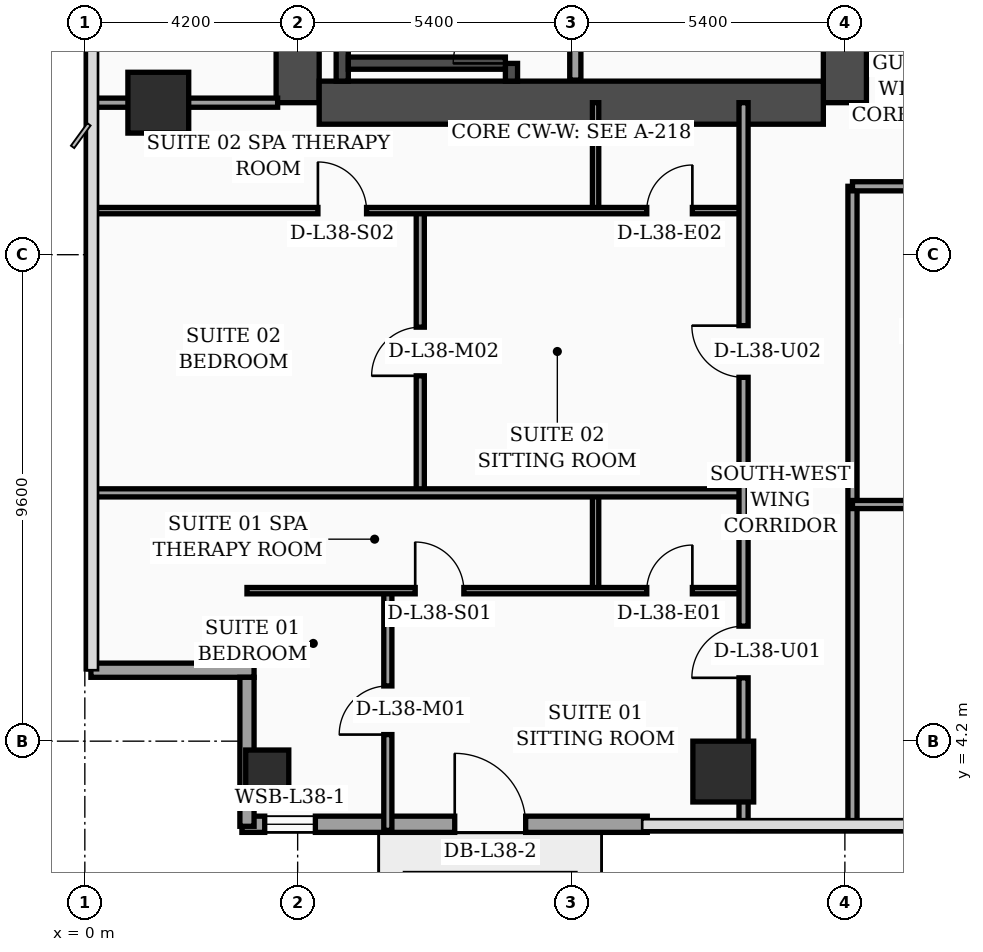
"""IFC4 building model, lengths in metres.
Left out: names, types, materials, properties, quantities, classifications, styles, units other than length and angle.
Written with IfcOpenShell. Run it as: python <this file> out.ifc"""

import sys

from ifc_helpers import new_model, si_unit, direction, frame, frame_2d, origin, origin_2d, place, context, subcontext, project, spatial, rectangle, hollow_rectangle, extrude, element, fill, save


model = new_model("IFC4")
c1 = context("Model", 3, precision=1e-05, world=origin(), true_north=direction((0.0, 1.0)))
c2 = subcontext(c1, "Body", "Model", "MODEL_VIEW")
j1 = project(units=[si_unit("LENGTHUNIT", "METRE"), si_unit("PLANEANGLEUNIT", "RADIAN")], contexts=[c1])
p1 = place(None, origin())
s1 = spatial("IfcSite", under=j1, at=p1, CompositionType="ELEMENT")
p2 = place(p1, origin())
s2 = spatial("IfcBuilding", under=s1, at=p2, CompositionType="ELEMENT")
p3 = place(p2, frame((0.0, 0.0, 156.1)))
s3 = spatial("IfcBuildingStorey", under=s2, at=p3, CompositionType="ELEMENT", Elevation=156.1)
p4 = place(p3, frame((4.2, 16.8, 0.0), z_axis=(0.0, 0.0, 1.0), x_axis=(0.0, 1.0, 0.0)))
e1 = element("IfcWall", 1, at=p4, inside=s3, PredefinedType="SHEAR", context=c2, shape_type="SweptSolid", body=[
    extrude(rectangle(XDim=21.6, YDim=0.85, at=frame_2d((10.8, 0.0))), origin(), (0.0, 0.0, 1.0), 3.56),
])
p5 = place(p3, frame((15.0, 16.8, 0.0), z_axis=(0.0, 0.0, 1.0), x_axis=(0.0, 1.0, 0.0)))
e2 = element("IfcWall", 2, at=p5, inside=s3, PredefinedType="SHEAR", context=c2, shape_type="SweptSolid", body=[
    extrude(rectangle(XDim=21.6, YDim=0.85, at=frame_2d((10.8, 0.0))), origin(), (0.0, 0.0, 1.0), 3.56),
])
p6 = place(p5, frame((8.65, 0.0, 0.0)))
e3 = element("IfcOpeningElement", 3, at=p6, cuts=e2, PredefinedType="OPENING", context=c2, shape_type="SweptSolid", body=[
    extrude(rectangle(XDim=1.1, YDim=2.2, at=frame_2d((0.55, 1.1))), frame((0.0, 0.435, 0.0), z_axis=(0.0, -1.0, 0.0), x_axis=(1.0, 0.0, 0.0)), (0.0, 0.0, 1.0), 0.87),
])
p7 = place(p5, frame((10.85, 0.0, 0.0)))
e4 = element("IfcOpeningElement", 4, at=p7, cuts=e2, PredefinedType="OPENING", context=c2, shape_type="SweptSolid", body=[
    extrude(rectangle(XDim=1.1, YDim=2.2, at=frame_2d((0.55, 1.1))), frame((0.0, 0.435, 0.0), z_axis=(0.0, -1.0, 0.0), x_axis=(1.0, 0.0, 0.0)), (0.0, 0.0, 1.0), 0.87),
])
p8 = place(p5, frame((13.5, 0.0, 0.0)))
e5 = element("IfcOpeningElement", 5, at=p8, cuts=e2, PredefinedType="OPENING", context=c2, shape_type="SweptSolid", body=[
    extrude(rectangle(XDim=1.1, YDim=2.2, at=frame_2d((0.55, 1.1))), frame((0.0, 0.435, 0.0), z_axis=(0.0, -1.0, 0.0), x_axis=(1.0, 0.0, 0.0)), (0.0, 0.0, 1.0), 0.87),
])
p9 = place(p5, frame((16.15, 0.0, 0.0)))
e6 = element("IfcOpeningElement", 6, at=p9, cuts=e2, PredefinedType="OPENING", context=c2, shape_type="SweptSolid", body=[
    extrude(rectangle(XDim=1.1, YDim=2.2, at=frame_2d((0.55, 1.1))), frame((0.0, 0.435, 0.0), z_axis=(0.0, -1.0, 0.0), x_axis=(1.0, 0.0, 0.0)), (0.0, 0.0, 1.0), 0.87),
])
p10 = place(p3, frame((4.625, 16.8, 0.0), z_axis=(0.0, 0.0, 1.0), x_axis=(1.0, 0.0, 0.0)))
e7 = element("IfcWall", 7, at=p10, inside=s3, PredefinedType="SHEAR", context=c2, shape_type="SweptSolid", body=[
    extrude(rectangle(XDim=9.95, YDim=0.85, at=frame_2d((4.975, 0.0))), origin(), (0.0, 0.0, 1.0), 3.56),
])
p11 = place(p3, frame((5.08, 17.225, 0.0), z_axis=(0.0, 0.0, 1.0), x_axis=(0.0, 1.0, 0.0)))
e8 = element("IfcWall", 8, at=p11, inside=s3, PredefinedType="SOLIDWALL", context=c2, shape_type="SweptSolid", body=[
    extrude(rectangle(XDim=9.565, YDim=0.24, at=frame_2d((4.782, 0.0))), origin(), (0.0, 0.0, 1.0), 3.56),
])
p12 = place(p3, frame((8.42, 17.225, 0.0), z_axis=(0.0, 0.0, 1.0), x_axis=(0.0, 1.0, 0.0)))
e9 = element("IfcWall", 9, at=p12, inside=s3, PredefinedType="SOLIDWALL", context=c2, shape_type="SweptSolid", body=[
    extrude(rectangle(XDim=9.565, YDim=0.24, at=frame_2d((4.782, 0.0))), origin(), (0.0, 0.0, 1.0), 3.56),
])
p13 = place(p12, frame((0.35, 0.0, 0.0)))
e10 = element("IfcOpeningElement", 10, at=p13, cuts=e9, PredefinedType="OPENING", context=c2, shape_type="SweptSolid", body=[
    extrude(rectangle(XDim=1.15, YDim=2.2, at=frame_2d((0.575, 1.1))), frame((0.0, 0.13, 0.0), z_axis=(0.0, -1.0, 0.0), x_axis=(1.0, 0.0, 0.0)), (0.0, 0.0, 1.0), 0.26),
])
p14 = place(p3, frame((5.2, 17.58, 0.0), z_axis=(0.0, 0.0, 1.0), x_axis=(1.0, 0.0, 0.0)))
e11 = element("IfcWall", 11, at=p14, inside=s3, PredefinedType="SOLIDWALL", context=c2, shape_type="SweptSolid", body=[
    extrude(rectangle(XDim=3.1, YDim=0.24, at=frame_2d((1.55, 0.0))), origin(), (0.0, 0.0, 1.0), 3.56),
])
p15 = place(p3, frame((3.6, 3.6, 0.0), z_axis=(0.0, 0.0, 1.0), x_axis=(1.0, 0.0, 0.0)))
e12 = element("IfcColumn", 12, at=p15, inside=s3, PredefinedType="COLUMN", context=c2, shape_type="SweptSolid", body=[
    extrude(hollow_rectangle(XDim=0.85, YDim=0.85, WallThickness=0.036, at=origin_2d()), origin(), (0.0, 0.0, 1.0), 3.56),
])
for number, where, z_axis, x_axis in (
    (13, (1.45, 16.8, 0.0), (0.0, 0.0, 1.0), (1.0, 0.0, 0.0)),
    (14, (12.6, 3.6, 0.0), (0.0, 0.0, 1.0), (1.0, 0.0, 0.0)),
):
    element("IfcColumn", number, at=place(p3, frame(where, z_axis=z_axis, x_axis=x_axis)), inside=s3, PredefinedType="COLUMN", context=c2, shape_type="SweptSolid", body=[
        extrude(rectangle(XDim=1.2, YDim=1.2, at=origin_2d()), origin(), (0.0, 0.0, 1.0), 3.56),
    ])
p16 = place(p3, frame((3.1, 2.56, 0.0), z_axis=(0.0, 0.0, 1.0), x_axis=(1.0, 0.0, 0.0)))
e15 = element("IfcWall", 15, at=p16, inside=s3, PredefinedType="SOLIDWALL", context=c2, shape_type="SweptSolid", body=[
    extrude(rectangle(XDim=8.0, YDim=0.32, at=frame_2d((4.0, 0.0))), origin(), (0.0, 0.0, 1.0), 3.56),
])
p17 = place(p16, frame((0.45, 0.0, 0.75)))
e16 = element("IfcOpeningElement", 16, at=p17, cuts=e15, PredefinedType="OPENING", context=c2, shape_type="SweptSolid", body=[
    extrude(rectangle(XDim=1.0, YDim=1.6, at=frame_2d((0.5, 0.8))), frame((0.0, 0.17, 0.0), z_axis=(0.0, -1.0, 0.0), x_axis=(1.0, 0.0, 0.0)), (0.0, 0.0, 1.0), 0.34),
])
p18 = place(p16, frame((4.2, 0.0, 0.0)))
e17 = element("IfcOpeningElement", 17, at=p18, cuts=e15, PredefinedType="OPENING", context=c2, shape_type="SweptSolid", body=[
    extrude(rectangle(XDim=1.4, YDim=2.25, at=frame_2d((0.7, 1.125))), frame((0.0, 0.17, 0.0), z_axis=(0.0, -1.0, 0.0), x_axis=(1.0, 0.0, 0.0)), (0.0, 0.0, 1.0), 0.34),
])
p19 = place(p3, frame((0.12, 5.6, 0.0), z_axis=(0.0, 0.0, 1.0), x_axis=(1.0, 0.0, 0.0)))
e18 = element("IfcWall", 18, at=p19, inside=s3, PredefinedType="SOLIDWALL", context=c2, shape_type="SweptSolid", body=[
    extrude(rectangle(XDim=3.22, YDim=0.28, at=frame_2d((1.61, 0.0))), origin(), (0.0, 0.0, 1.0), 2.94),
])
p20 = place(p3, frame((3.2, 5.46, 0.0), z_axis=(0.0, 0.0, 1.0), x_axis=(0.0, -1.0, 0.0)))
e19 = element("IfcWall", 19, at=p20, inside=s3, PredefinedType="SOLIDWALL", context=c2, shape_type="SweptSolid", body=[
    extrude(rectangle(XDim=2.94, YDim=0.28, at=frame_2d((1.47, 0.0))), origin(), (0.0, 0.0, 1.0), 2.94),
])
p21 = place(p3, frame((9.68, 17.245, 0.0), z_axis=(0.0, 0.0, 1.0), x_axis=(0.0, 1.0, 0.0)))
e20 = element("IfcWall", 20, at=p21, inside=s3, PredefinedType="SOLIDWALL", context=c2, shape_type="SweptSolid", body=[
    extrude(rectangle(XDim=7.755, YDim=0.22, at=frame_2d((3.877, 0.0))), origin(), (0.0, 0.0, 1.0), 3.56),
])
p22 = place(p3, frame((0.08, 16.8, 0.0), z_axis=(0.0, 0.0, 1.0), x_axis=(1.0, 0.0, 0.0)))
e21 = element("IfcWall", 21, at=p22, inside=s3, PredefinedType="PARTITIONING", context=c2, shape_type="SweptSolid", body=[
    extrude(rectangle(XDim=3.725, YDim=0.18, at=frame_2d((1.862, 0.0))), origin(), (0.0, 0.0, 1.0), 2.94),
])
p23 = place(p3, frame((10.08, 7.17, 0.0), z_axis=(0.0, 0.0, 1.0), x_axis=(0.0, 1.0, 0.0)))
e22 = element("IfcWall", 22, at=p23, inside=s3, PredefinedType="PARTITIONING", context=c2, shape_type="SweptSolid", body=[
    extrude(rectangle(XDim=1.93, YDim=0.125, at=frame_2d((0.965, 0.0))), origin(), (0.0, 0.0, 1.0), 3.09),
])
p24 = place(p3, frame((5.98, 2.44, 0.0), z_axis=(0.0, 0.0, 1.0), x_axis=(0.0, 1.0, 0.0)))
e23 = element("IfcWall", 23, at=p24, inside=s3, PredefinedType="PARTITIONING", context=c2, shape_type="SweptSolid", body=[
    extrude(rectangle(XDim=4.73, YDim=0.16, at=frame_2d((2.365, 0.0))), origin(), (0.0, 0.0, 1.0), 3.04),
])
p25 = place(p24, frame((1.89, 0.0, 0.0)))
e24 = element("IfcOpeningElement", 24, at=p25, cuts=e23, PredefinedType="OPENING", context=c2, shape_type="SweptSolid", body=[
    extrude(rectangle(XDim=0.96, YDim=2.2, at=frame_2d((0.48, 1.1))), frame((0.0, 0.09, 0.0), z_axis=(0.0, -1.0, 0.0), x_axis=(1.0, 0.0, 0.0)), (0.0, 0.0, 1.0), 0.18),
])
p26 = place(p3, frame((3.2, 7.17, 0.0), z_axis=(0.0, 0.0, 1.0), x_axis=(1.0, 0.0, 0.0)))
e25 = element("IfcWall", 25, at=p26, inside=s3, PredefinedType="PARTITIONING", context=c2, shape_type="SweptSolid", body=[
    extrude(rectangle(XDim=9.8, YDim=0.125, at=frame_2d((4.9, 0.0))), origin(), (0.0, 0.0, 1.0), 2.94),
])
p27 = place(p26, frame((3.32, 0.0, 0.0)))
e26 = element("IfcOpeningElement", 26, at=p27, cuts=e25, PredefinedType="OPENING", context=c2, shape_type="SweptSolid", body=[
    extrude(rectangle(XDim=0.96, YDim=2.2, at=frame_2d((0.48, 1.1))), frame((0.0, 0.073, 0.0), z_axis=(0.0, -1.0, 0.0), x_axis=(1.0, 0.0, 0.0)), (0.0, 0.0, 1.0), 0.145),
])
p28 = place(p26, frame((7.89, 0.0, 0.0)))
e27 = element("IfcOpeningElement", 27, at=p28, cuts=e25, PredefinedType="OPENING", context=c2, shape_type="SweptSolid", body=[
    extrude(rectangle(XDim=0.9, YDim=2.15, at=frame_2d((0.45, 1.075))), frame((0.0, 0.073, 0.0), z_axis=(0.0, -1.0, 0.0), x_axis=(1.0, 0.0, 0.0)), (0.0, 0.0, 1.0), 0.145),
])
p29 = place(p3, frame((10.08, 14.67, 0.0), z_axis=(0.0, 0.0, 1.0), x_axis=(0.0, 1.0, 0.0)))
e28 = element("IfcWall", 28, at=p29, inside=s3, PredefinedType="PARTITIONING", context=c2, shape_type="SweptSolid", body=[
    extrude(rectangle(XDim=2.13, YDim=0.125, at=frame_2d((1.065, 0.0))), origin(), (0.0, 0.0, 1.0), 3.56),
])
p30 = place(p3, frame((6.62, 9.1, 0.0), z_axis=(0.0, 0.0, 1.0), x_axis=(0.0, 1.0, 0.0)))
e29 = element("IfcWall", 29, at=p30, inside=s3, PredefinedType="PARTITIONING", context=c2, shape_type="SweptSolid", body=[
    extrude(rectangle(XDim=5.57, YDim=0.16, at=frame_2d((2.785, 0.0))), origin(), (0.0, 0.0, 1.0), 3.14),
])
p31 = place(p30, frame((2.31, 0.0, 0.0)))
e30 = element("IfcOpeningElement", 30, at=p31, cuts=e29, PredefinedType="OPENING", context=c2, shape_type="SweptSolid", body=[
    extrude(rectangle(XDim=0.96, YDim=2.2, at=frame_2d((0.48, 1.1))), frame((0.0, 0.09, 0.0), z_axis=(0.0, -1.0, 0.0), x_axis=(1.0, 0.0, 0.0)), (0.0, 0.0, 1.0), 0.18),
])
p32 = place(p3, frame((0.08, 14.67, 0.0), z_axis=(0.0, 0.0, 1.0), x_axis=(1.0, 0.0, 0.0)))
e31 = element("IfcWall", 31, at=p32, inside=s3, PredefinedType="PARTITIONING", context=c2, shape_type="SweptSolid", body=[
    extrude(rectangle(XDim=12.92, YDim=0.125, at=frame_2d((6.46, 0.0))), origin(), (0.0, 0.0, 1.0), 2.94),
])
p33 = place(p32, frame((4.52, 0.0, 0.0)))
e32 = element("IfcOpeningElement", 32, at=p33, cuts=e31, PredefinedType="OPENING", context=c2, shape_type="SweptSolid", body=[
    extrude(rectangle(XDim=0.96, YDim=2.2, at=frame_2d((0.48, 1.1))), frame((0.0, 0.073, 0.0), z_axis=(0.0, -1.0, 0.0), x_axis=(1.0, 0.0, 0.0)), (0.0, 0.0, 1.0), 0.145),
])
p34 = place(p32, frame((11.01, 0.0, 0.0)))
e33 = element("IfcOpeningElement", 33, at=p34, cuts=e31, PredefinedType="OPENING", context=c2, shape_type="SweptSolid", body=[
    extrude(rectangle(XDim=0.9, YDim=2.15, at=frame_2d((0.45, 1.075))), frame((0.0, 0.073, 0.0), z_axis=(0.0, -1.0, 0.0), x_axis=(1.0, 0.0, 0.0)), (0.0, 0.0, 1.0), 0.145),
])
p35 = place(p3, frame((0.08, 9.1, 0.0), z_axis=(0.0, 0.0, 1.0), x_axis=(1.0, 0.0, 0.0)))
e34 = element("IfcWall", 34, at=p35, inside=s3, PredefinedType="PARTITIONING", context=c2, shape_type="SweptSolid", body=[
    extrude(rectangle(XDim=12.92, YDim=0.16, at=frame_2d((6.46, 0.0))), origin(), (0.0, 0.0, 1.0), 2.94),
])
p36 = place(p3, frame((13.0, 2.44, 0.0), z_axis=(0.0, 0.0, 1.0), x_axis=(0.0, 1.0, 0.0)))
e35 = element("IfcWall", 35, at=p36, inside=s3, PredefinedType="PARTITIONING", context=c2, shape_type="SweptSolid", body=[
    extrude(rectangle(XDim=14.36, YDim=0.18, at=frame_2d((7.18, 0.0))), origin(), (0.0, 0.0, 1.0), 2.94),
])
p37 = place(p36, frame((3.01, 0.0, 0.0)))
e36 = element("IfcOpeningElement", 36, at=p37, cuts=e35, PredefinedType="OPENING", context=c2, shape_type="SweptSolid", body=[
    extrude(rectangle(XDim=1.02, YDim=2.2, at=frame_2d((0.51, 1.1))), frame((0.0, 0.1, 0.0), z_axis=(0.0, -1.0, 0.0), x_axis=(1.0, 0.0, 0.0)), (0.0, 0.0, 1.0), 0.2),
])
p38 = place(p36, frame((8.94, 0.0, 0.0)))
e37 = element("IfcOpeningElement", 37, at=p38, cuts=e35, PredefinedType="OPENING", context=c2, shape_type="SweptSolid", body=[
    extrude(rectangle(XDim=1.02, YDim=2.2, at=frame_2d((0.51, 1.1))), frame((0.0, 0.1, 0.0), z_axis=(0.0, -1.0, 0.0), x_axis=(1.0, 0.0, 0.0)), (0.0, 0.0, 1.0), 0.2),
])
p39 = place(p3, frame((15.15, 2.44, 0.0), z_axis=(0.0, 0.0, 1.0), x_axis=(0.0, 1.0, 0.0)))
e38 = element("IfcWall", 38, at=p39, inside=s3, PredefinedType="PARTITIONING", context=c2, shape_type="SweptSolid", body=[
    extrude(rectangle(XDim=12.71, YDim=0.18, at=frame_2d((6.355, 0.0))), origin(), (0.0, 0.0, 1.0), 3.04),
])
p40 = place(p3, frame((15.15, 8.87, 0.0), z_axis=(0.0, 0.0, 1.0), x_axis=(1.0, 0.0, 0.0)))
e39 = element("IfcWall", 39, at=p40, inside=s3, PredefinedType="PARTITIONING", context=c2, shape_type="SweptSolid", body=[
    extrude(rectangle(XDim=4.45, YDim=0.16, at=frame_2d((2.225, 0.0))), origin(), (0.0, 0.0, 1.0), 3.56),
])
p41 = place(p40, frame((1.75, 0.0, 0.0)))
e40 = element("IfcOpeningElement", 40, at=p41, cuts=e39, PredefinedType="OPENING", context=c2, shape_type="SweptSolid", body=[
    extrude(rectangle(XDim=0.96, YDim=2.2, at=frame_2d((0.48, 1.1))), frame((0.0, 0.09, 0.0), z_axis=(0.0, -1.0, 0.0), x_axis=(1.0, 0.0, 0.0)), (0.0, 0.0, 1.0), 0.18),
])
p42 = place(p3, frame((15.15, 15.15, 0.0), z_axis=(0.0, 0.0, 1.0), x_axis=(1.0, 0.0, 0.0)))
e41 = element("IfcWall", 41, at=p42, inside=s3, PredefinedType="PARTITIONING", context=c2, shape_type="SweptSolid", body=[
    extrude(rectangle(XDim=6.45, YDim=0.18, at=frame_2d((3.225, 0.0))), origin(), (0.0, 0.0, 1.0), 2.49),
])
p43 = place(p42, frame((1.74, 0.0, 0.0)))
e42 = element("IfcOpeningElement", 42, at=p43, cuts=e41, PredefinedType="OPENING", context=c2, shape_type="SweptSolid", body=[
    extrude(rectangle(XDim=1.02, YDim=2.2, at=frame_2d((0.51, 1.1))), frame((0.0, 0.1, 0.0), z_axis=(0.0, -1.0, 0.0), x_axis=(1.0, 0.0, 0.0)), (0.0, 0.0, 1.0), 0.2),
])
p44 = place(p17, origin())
e43 = element("IfcWindow", 43, at=p44, inside=s3, PartitioningType="SINGLE_PANEL", PredefinedType="WINDOW", context=c2, shape_type="SweptSolid", body=[
    extrude(rectangle(XDim=1.0, YDim=1.6, at=frame_2d((0.5, 0.8))), frame((0.0, 0.03, 0.0), z_axis=(0.0, -1.0, 0.0), x_axis=(1.0, 0.0, 0.0)), (0.0, 0.0, 1.0), 0.06),
])
fill(e16, e43)
p45 = place(p18, origin())
e44 = element("IfcDoor", 44, at=p45, inside=s3, OperationType="SINGLE_SWING_LEFT", PredefinedType="DOOR", context=c2, shape_type="SweptSolid", body=[
    extrude(rectangle(XDim=1.4, YDim=2.25, at=frame_2d((0.7, 1.125))), frame((0.0, 0.025, 0.0), z_axis=(0.0, -1.0, 0.0), x_axis=(1.0, 0.0, 0.0)), (0.0, 0.0, 1.0), 0.05),
])
fill(e17, e44)
p46 = place(p25, origin())
e45 = element("IfcDoor", 45, at=p46, inside=s3, OperationType="SINGLE_SWING_LEFT", PredefinedType="DOOR", context=c2, shape_type="SweptSolid", body=[
    extrude(rectangle(XDim=0.96, YDim=2.2, at=frame_2d((0.48, 1.1))), frame((0.0, 0.025, 0.0), z_axis=(0.0, -1.0, 0.0), x_axis=(1.0, 0.0, 0.0)), (0.0, 0.0, 1.0), 0.05),
])
fill(e24, e45)
p47 = place(p27, origin())
e46 = element("IfcDoor", 46, at=p47, inside=s3, OperationType="SINGLE_SWING_LEFT", PredefinedType="DOOR", context=c2, shape_type="SweptSolid", body=[
    extrude(rectangle(XDim=0.96, YDim=2.2, at=frame_2d((0.48, 1.1))), frame((0.0, 0.025, 0.0), z_axis=(0.0, -1.0, 0.0), x_axis=(1.0, 0.0, 0.0)), (0.0, 0.0, 1.0), 0.05),
])
fill(e26, e46)
p48 = place(p28, origin())
e47 = element("IfcDoor", 47, at=p48, inside=s3, OperationType="SINGLE_SWING_RIGHT", PredefinedType="DOOR", context=c2, shape_type="SweptSolid", body=[
    extrude(rectangle(XDim=0.9, YDim=2.15, at=frame_2d((0.45, 1.075))), frame((0.0, 0.025, 0.0), z_axis=(0.0, -1.0, 0.0), x_axis=(1.0, 0.0, 0.0)), (0.0, 0.0, 1.0), 0.05),
])
fill(e27, e47)
p49 = place(p31, origin())
e48 = element("IfcDoor", 48, at=p49, inside=s3, OperationType="SINGLE_SWING_LEFT", PredefinedType="DOOR", context=c2, shape_type="SweptSolid", body=[
    extrude(rectangle(XDim=0.96, YDim=2.2, at=frame_2d((0.48, 1.1))), frame((0.0, 0.025, 0.0), z_axis=(0.0, -1.0, 0.0), x_axis=(1.0, 0.0, 0.0)), (0.0, 0.0, 1.0), 0.05),
])
fill(e30, e48)
p50 = place(p33, origin())
e49 = element("IfcDoor", 49, at=p50, inside=s3, OperationType="SINGLE_SWING_LEFT", PredefinedType="DOOR", context=c2, shape_type="SweptSolid", body=[
    extrude(rectangle(XDim=0.96, YDim=2.2, at=frame_2d((0.48, 1.1))), frame((0.0, 0.025, 0.0), z_axis=(0.0, -1.0, 0.0), x_axis=(1.0, 0.0, 0.0)), (0.0, 0.0, 1.0), 0.05),
])
fill(e32, e49)
p51 = place(p34, origin())
e50 = element("IfcDoor", 50, at=p51, inside=s3, OperationType="SINGLE_SWING_RIGHT", PredefinedType="DOOR", context=c2, shape_type="SweptSolid", body=[
    extrude(rectangle(XDim=0.9, YDim=2.15, at=frame_2d((0.45, 1.075))), frame((0.0, 0.025, 0.0), z_axis=(0.0, -1.0, 0.0), x_axis=(1.0, 0.0, 0.0)), (0.0, 0.0, 1.0), 0.05),
])
fill(e33, e50)
p52 = place(p37, origin())
e51 = element("IfcDoor", 51, at=p52, inside=s3, OperationType="SINGLE_SWING_LEFT", PredefinedType="DOOR", context=c2, shape_type="SweptSolid", body=[
    extrude(rectangle(XDim=1.02, YDim=2.2, at=frame_2d((0.51, 1.1))), frame((0.0, 0.025, 0.0), z_axis=(0.0, -1.0, 0.0), x_axis=(1.0, 0.0, 0.0)), (0.0, 0.0, 1.0), 0.05),
])
fill(e36, e51)
p53 = place(p38, origin())
e52 = element("IfcDoor", 52, at=p53, inside=s3, OperationType="SINGLE_SWING_RIGHT", PredefinedType="DOOR", context=c2, shape_type="SweptSolid", body=[
    extrude(rectangle(XDim=1.02, YDim=2.2, at=frame_2d((0.51, 1.1))), frame((0.0, 0.025, 0.0), z_axis=(0.0, -1.0, 0.0), x_axis=(1.0, 0.0, 0.0)), (0.0, 0.0, 1.0), 0.05),
])
fill(e37, e52)
p54 = place(p13, origin())
e53 = element("IfcDoor", 53, at=p54, inside=s3, OperationType="SINGLE_SWING_LEFT", PredefinedType="DOOR", context=c2, shape_type="SweptSolid", body=[
    extrude(rectangle(XDim=1.15, YDim=2.2, at=frame_2d((0.575, 1.1))), frame((0.0, 0.025, 0.0), z_axis=(0.0, -1.0, 0.0), x_axis=(1.0, 0.0, 0.0)), (0.0, 0.0, 1.0), 0.05),
])
fill(e10, e53)
save(model, sys.argv[1])
